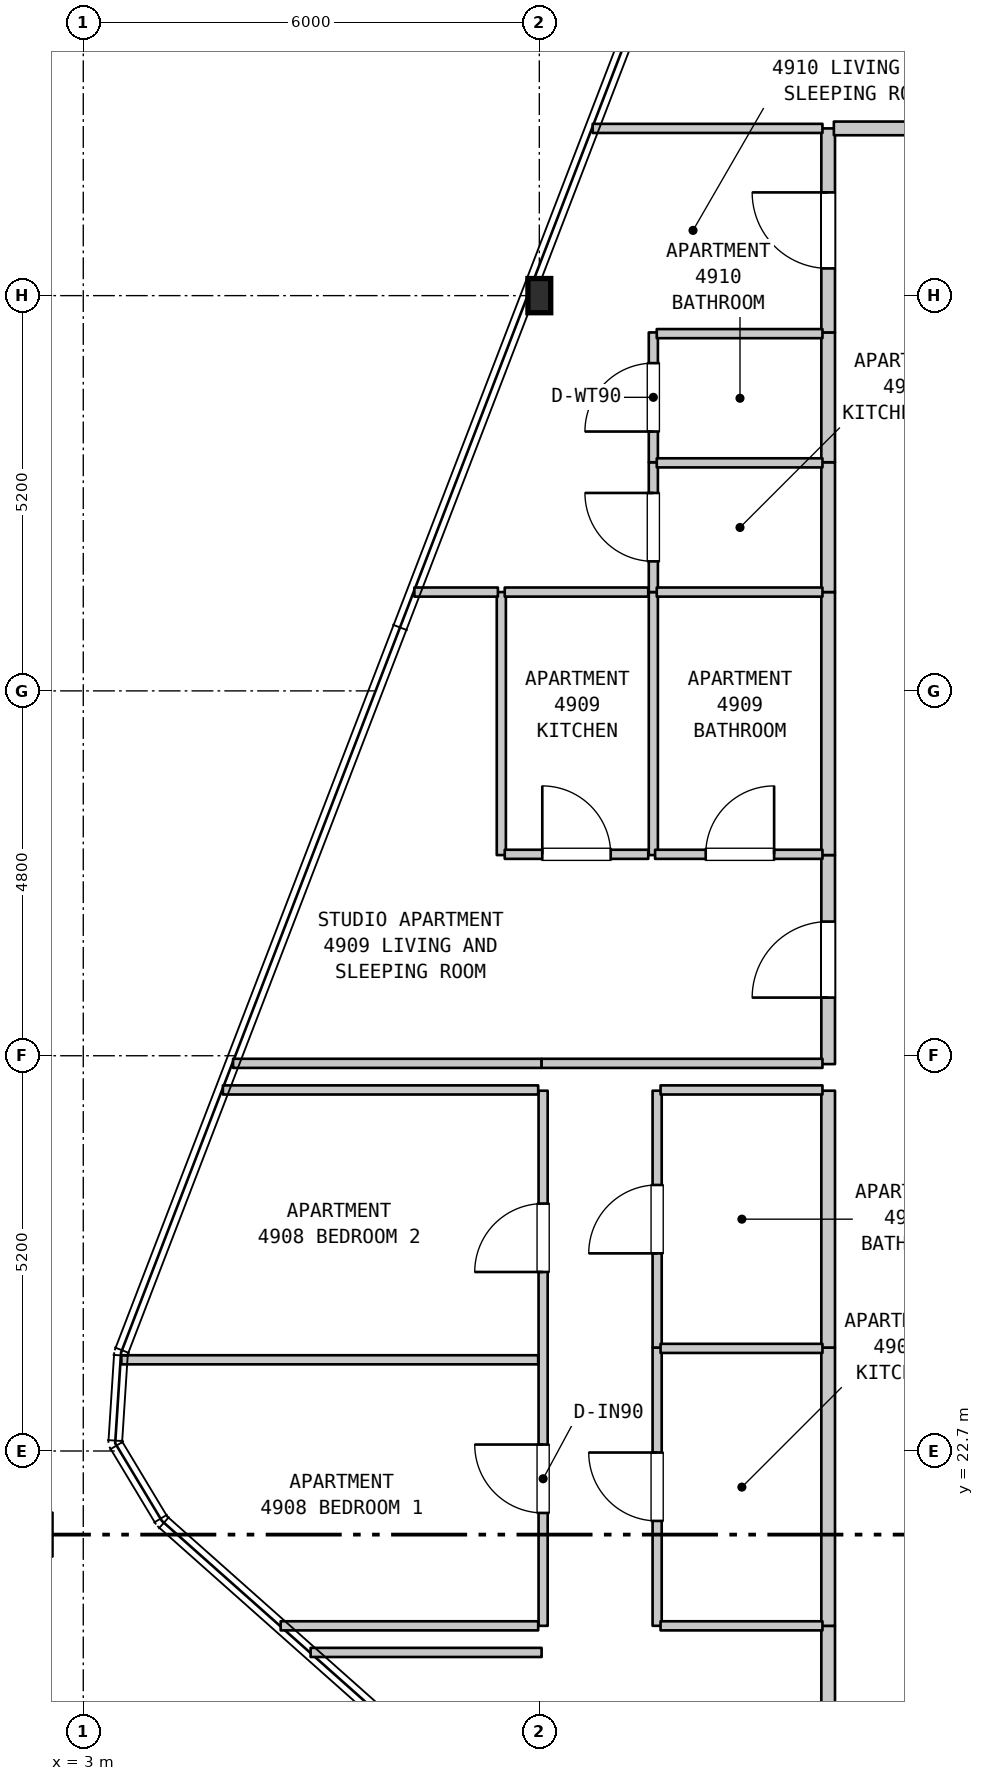
"""IFC4 building model, lengths in metres.
Left out: names, types, materials, properties, quantities, classifications, styles, units other than length and angle.
Written with IfcOpenShell. Run it as: python <this file> out.ifc"""

import sys

from ifc_helpers import new_model, si_unit, direction, frame, frame_2d, origin, origin_2d, place, context, subcontext, project, spatial, rectangle, i_section, extrude, element, fill, save


model = new_model("IFC4")
c1 = context("Model", 3, precision=1e-05, world=origin(), true_north=direction((0.0, 1.0)))
c2 = subcontext(c1, "Body", "Model", "MODEL_VIEW")
j1 = project(units=[si_unit("LENGTHUNIT", "METRE"), si_unit("PLANEANGLEUNIT", "RADIAN")], contexts=[c1])
p1 = place(None, origin())
s1 = spatial("IfcSite", under=j1, at=p1, CompositionType="ELEMENT")
p2 = place(p1, origin())
s2 = spatial("IfcBuilding", under=s1, at=p2, CompositionType="ELEMENT")
p3 = place(p2, frame((0.0, 0.0, 199.5)))
s3 = spatial("IfcBuildingStorey", under=s2, at=p3, CompositionType="ELEMENT", Elevation=199.5)
p4 = place(p3, frame((9.0, 37.9, 0.0), z_axis=(0.0, 0.0, 1.0), x_axis=(1.0, 0.0, 0.0)))
e1 = element("IfcColumn", 1, at=p4, inside=s3, PredefinedType="COLUMN", context=c2, shape_type="SweptSolid", body=[
    extrude(i_section(OverallWidth=0.3, OverallDepth=0.45, WebThickness=0.014, FlangeThickness=0.026, FilletRadius=0.027, at=origin_2d()), origin(), (0.0, 0.0, 1.0), 3.7),
])
p5 = place(p3, frame((8.5, 30.54, 0.0), z_axis=(0.0, 0.0, 1.0), x_axis=(0.0, 1.0, 0.0)))
e2 = element("IfcWall", 2, at=p5, inside=s3, PredefinedType="PARTITIONING", context=c2, shape_type="SweptSolid", body=[
    extrude(rectangle(XDim=3.46, YDim=0.12, at=frame_2d((1.73, 0.0))), origin(), (0.0, 0.0, 1.0), 3.39),
])
p6 = place(p3, frame((9.05, 20.4, 0.0), z_axis=(0.0, 0.0, 1.0), x_axis=(0.0, 1.0, 0.0)))
e3 = element("IfcWall", 3, at=p6, inside=s3, PredefinedType="PARTITIONING", context=c2, shape_type="SweptSolid", body=[
    extrude(rectangle(XDim=7.04, YDim=0.12, at=frame_2d((3.52, 0.0))), origin(), (0.0, 0.0, 1.0), 2.79),
])
p7 = place(p6, frame((1.485, 0.0, 0.0)))
e4 = element("IfcOpeningElement", 4, at=p7, cuts=e3, PredefinedType="OPENING", context=c2, shape_type="SweptSolid", body=[
    extrude(rectangle(XDim=0.9, YDim=2.15, at=frame_2d((0.45, 1.075))), frame((0.0, 0.07, 0.0), z_axis=(0.0, -1.0, 0.0), x_axis=(1.0, 0.0, 0.0)), (0.0, 0.0, 1.0), 0.14),
])
p8 = place(p6, frame((4.655, 0.0, 0.0)))
e5 = element("IfcOpeningElement", 5, at=p8, cuts=e3, PredefinedType="OPENING", context=c2, shape_type="SweptSolid", body=[
    extrude(rectangle(XDim=0.9, YDim=2.15, at=frame_2d((0.45, 1.075))), frame((0.0, 0.07, 0.0), z_axis=(0.0, -1.0, 0.0), x_axis=(1.0, 0.0, 0.0)), (0.0, 0.0, 1.0), 0.14),
])
p9 = place(p3, frame((10.5, 30.54, 0.0), z_axis=(0.0, 0.0, 1.0), x_axis=(0.0, 1.0, 0.0)))
e6 = element("IfcWall", 6, at=p9, inside=s3, PredefinedType="PARTITIONING", context=c2, shape_type="SweptSolid", body=[
    extrude(rectangle(XDim=3.46, YDim=0.12, at=frame_2d((1.73, 0.0))), origin(), (0.0, 0.0, 1.0), 3.39),
])
p10 = place(p3, frame((10.5, 34.0, 0.0), z_axis=(0.0, 0.0, 1.0), x_axis=(0.0, 1.0, 0.0)))
e7 = element("IfcWall", 7, at=p10, inside=s3, PredefinedType="PARTITIONING", context=c2, shape_type="SweptSolid", body=[
    extrude(rectangle(XDim=1.708, YDim=0.12, at=frame_2d((0.854, 0.0))), origin(), (0.0, 0.0, 1.0), 3.39),
])
p11 = place(p10, frame((0.404, 0.0, 0.0)))
e8 = element("IfcOpeningElement", 8, at=p11, cuts=e7, PredefinedType="OPENING", context=c2, shape_type="SweptSolid", body=[
    extrude(rectangle(XDim=0.9, YDim=2.15, at=frame_2d((0.45, 1.075))), frame((0.0, 0.07, 0.0), z_axis=(0.0, -1.0, 0.0), x_axis=(1.0, 0.0, 0.0)), (0.0, 0.0, 1.0), 0.14),
])
p12 = place(p3, frame((10.5, 35.708, 0.0), z_axis=(0.0, 0.0, 1.0), x_axis=(0.0, 1.0, 0.0)))
e9 = element("IfcWall", 9, at=p12, inside=s3, PredefinedType="PARTITIONING", context=c2, shape_type="SweptSolid", body=[
    extrude(rectangle(XDim=1.708, YDim=0.12, at=frame_2d((0.854, 0.0))), origin(), (0.0, 0.0, 1.0), 3.39),
])
p13 = place(p12, frame((0.404, 0.0, 0.0)))
e10 = element("IfcOpeningElement", 10, at=p13, cuts=e9, PredefinedType="OPENING", context=c2, shape_type="SweptSolid", body=[
    extrude(rectangle(XDim=0.9, YDim=2.1, at=frame_2d((0.45, 1.05))), frame((0.0, 0.07, 0.0), z_axis=(0.0, -1.0, 0.0), x_axis=(1.0, 0.0, 0.0)), (0.0, 0.0, 1.0), 0.14),
])
p14 = place(p3, frame((10.55, 20.4, 0.0), z_axis=(0.0, 0.0, 1.0), x_axis=(0.0, 1.0, 0.0)))
e11 = element("IfcWall", 11, at=p14, inside=s3, PredefinedType="PARTITIONING", context=c2, shape_type="SweptSolid", body=[
    extrude(rectangle(XDim=3.661, YDim=0.12, at=frame_2d((1.831, 0.0))), origin(), (0.0, 0.0, 1.0), 3.39),
])
p15 = place(p14, frame((1.38, 0.0, 0.0)))
e12 = element("IfcOpeningElement", 12, at=p15, cuts=e11, PredefinedType="OPENING", context=c2, shape_type="SweptSolid", body=[
    extrude(rectangle(XDim=0.9, YDim=2.15, at=frame_2d((0.45, 1.075))), frame((0.0, 0.07, 0.0), z_axis=(0.0, -1.0, 0.0), x_axis=(1.0, 0.0, 0.0)), (0.0, 0.0, 1.0), 0.14),
])
p16 = place(p3, frame((10.55, 24.061, 0.0), z_axis=(0.0, 0.0, 1.0), x_axis=(0.0, 1.0, 0.0)))
e13 = element("IfcWall", 13, at=p16, inside=s3, PredefinedType="PARTITIONING", context=c2, shape_type="SweptSolid", body=[
    extrude(rectangle(XDim=3.379, YDim=0.12, at=frame_2d((1.689, 0.0))), origin(), (0.0, 0.0, 1.0), 3.39),
])
p17 = place(p16, frame((1.239, 0.0, 0.0)))
e14 = element("IfcOpeningElement", 14, at=p17, cuts=e13, PredefinedType="OPENING", context=c2, shape_type="SweptSolid", body=[
    extrude(rectangle(XDim=0.9, YDim=2.1, at=frame_2d((0.45, 1.05))), frame((0.0, 0.07, 0.0), z_axis=(0.0, -1.0, 0.0), x_axis=(1.0, 0.0, 0.0)), (0.0, 0.0, 1.0), 0.14),
])
p18 = place(p3, frame((12.8, 17.3, 0.0), z_axis=(0.0, 0.0, 1.0), x_axis=(0.0, 1.0, 0.0)))
e15 = element("IfcWall", 15, at=p18, inside=s3, PredefinedType="STANDARD", context=c2, shape_type="SweptSolid", body=[
    extrude(rectangle(XDim=3.1, YDim=0.18, at=frame_2d((1.55, 0.0))), origin(), (0.0, 0.0, 1.0), 3.39),
])
p19 = place(p18, frame((0.978, 0.0, 0.0)))
e16 = element("IfcOpeningElement", 16, at=p19, cuts=e15, PredefinedType="OPENING", context=c2, shape_type="SweptSolid", body=[
    extrude(rectangle(XDim=1.0, YDim=2.15, at=frame_2d((0.5, 1.075))), frame((0.0, 0.1, 0.0), z_axis=(0.0, -1.0, 0.0), x_axis=(1.0, 0.0, 0.0)), (0.0, 0.0, 1.0), 0.2),
])
p20 = place(p3, frame((12.8, 20.4, 0.0), z_axis=(0.0, 0.0, 1.0), x_axis=(0.0, 1.0, 0.0)))
e17 = element("IfcWall", 17, at=p20, inside=s3, PredefinedType="STANDARD", context=c2, shape_type="SweptSolid", body=[
    extrude(rectangle(XDim=3.661, YDim=0.18, at=frame_2d((1.831, 0.0))), origin(), (0.0, 0.0, 1.0), 3.39),
])
p21 = place(p3, frame((12.8, 24.061, 0.0), z_axis=(0.0, 0.0, 1.0), x_axis=(0.0, 1.0, 0.0)))
e18 = element("IfcWall", 18, at=p21, inside=s3, PredefinedType="STANDARD", context=c2, shape_type="SweptSolid", body=[
    extrude(rectangle(XDim=3.379, YDim=0.18, at=frame_2d((1.689, 0.0))), origin(), (0.0, 0.0, 1.0), 3.39),
])
p22 = place(p3, frame((12.8, 27.79, 0.0), z_axis=(0.0, 0.0, 1.0), x_axis=(0.0, 1.0, 0.0)))
e19 = element("IfcWall", 19, at=p22, inside=s3, PredefinedType="STANDARD", context=c2, shape_type="SweptSolid", body=[
    extrude(rectangle(XDim=2.75, YDim=0.18, at=frame_2d((1.375, 0.0))), origin(), (0.0, 0.0, 1.0), 3.39),
])
p23 = place(p22, frame((0.875, 0.0, 0.0)))
e20 = element("IfcOpeningElement", 20, at=p23, cuts=e19, PredefinedType="OPENING", context=c2, shape_type="SweptSolid", body=[
    extrude(rectangle(XDim=1.0, YDim=2.15, at=frame_2d((0.5, 1.075))), frame((0.0, 0.1, 0.0), z_axis=(0.0, -1.0, 0.0), x_axis=(1.0, 0.0, 0.0)), (0.0, 0.0, 1.0), 0.2),
])
p24 = place(p3, frame((12.8, 30.54, 0.0), z_axis=(0.0, 0.0, 1.0), x_axis=(0.0, 1.0, 0.0)))
e21 = element("IfcWall", 21, at=p24, inside=s3, PredefinedType="STANDARD", context=c2, shape_type="SweptSolid", body=[
    extrude(rectangle(XDim=3.46, YDim=0.18, at=frame_2d((1.73, 0.0))), origin(), (0.0, 0.0, 1.0), 3.39),
])
for number, where, z_axis, x_axis in (
    (22, (12.8, 34.0, 0.0), (0.0, 0.0, 1.0), (0.0, 1.0, 0.0)),
    (23, (12.8, 35.708, 0.0), (0.0, 0.0, 1.0), (0.0, 1.0, 0.0)),
):
    element("IfcWall", number, at=place(p3, frame(where, z_axis=z_axis, x_axis=x_axis)), inside=s3, PredefinedType="STANDARD", context=c2, shape_type="SweptSolid", body=[
        extrude(rectangle(XDim=1.708, YDim=0.18, at=frame_2d((0.854, 0.0))), origin(), (0.0, 0.0, 1.0), 3.39),
    ])
p25 = place(p3, frame((12.8, 37.416, 0.0), z_axis=(0.0, 0.0, 1.0), x_axis=(0.0, 1.0, 0.0)))
e24 = element("IfcWall", 24, at=p25, inside=s3, PredefinedType="STANDARD", context=c2, shape_type="SweptSolid", body=[
    extrude(rectangle(XDim=2.684, YDim=0.18, at=frame_2d((1.342, 0.0))), origin(), (0.0, 0.0, 1.0), 3.39),
])
p26 = place(p25, frame((0.842, 0.0, 0.0)))
e25 = element("IfcOpeningElement", 25, at=p26, cuts=e24, PredefinedType="OPENING", context=c2, shape_type="SweptSolid", body=[
    extrude(rectangle(XDim=1.0, YDim=2.15, at=frame_2d((0.5, 1.075))), frame((0.0, 0.1, 0.0), z_axis=(0.0, -1.0, 0.0), x_axis=(1.0, 0.0, 0.0)), (0.0, 0.0, 1.0), 0.2),
])
p27 = place(p3, frame((5.991, 20.05, 0.0), z_axis=(0.0, 0.0, 1.0), x_axis=(1.0, 0.0, 0.0)))
e26 = element("IfcWall", 26, at=p27, inside=s3, PredefinedType="PARTITIONING", context=c2, shape_type="SweptSolid", body=[
    extrude(rectangle(XDim=3.039, YDim=0.12, at=frame_2d((1.52, 0.0))), origin(), (0.0, 0.0, 1.0), 3.39),
])
p28 = place(p3, frame((5.597, 20.4, 0.0), z_axis=(0.0, 0.0, 1.0), x_axis=(1.0, 0.0, 0.0)))
e27 = element("IfcWall", 27, at=p28, inside=s3, PredefinedType="PARTITIONING", context=c2, shape_type="SweptSolid", body=[
    extrude(rectangle(XDim=3.388, YDim=0.12, at=frame_2d((1.694, 0.0))), origin(), (0.0, 0.0, 1.0), 3.39),
])
p29 = place(p3, frame((10.595, 20.4, 0.0), z_axis=(0.0, 0.0, 1.0), x_axis=(1.0, 0.0, 0.0)))
e28 = element("IfcWall", 28, at=p29, inside=s3, PredefinedType="PARTITIONING", context=c2, shape_type="SweptSolid", body=[
    extrude(rectangle(XDim=2.13, YDim=0.12, at=frame_2d((1.065, 0.0))), origin(), (0.0, 0.0, 1.0), 3.39),
])
p30 = place(p3, frame((3.501, 23.9, 0.0), z_axis=(0.0, 0.0, 1.0), x_axis=(1.0, 0.0, 0.0)))
e29 = element("IfcWall", 29, at=p30, inside=s3, PredefinedType="PARTITIONING", context=c2, shape_type="SweptSolid", body=[
    extrude(rectangle(XDim=5.484, YDim=0.12, at=frame_2d((2.742, 0.0))), origin(), (0.0, 0.0, 1.0), 3.39),
])
p31 = place(p3, frame((10.595, 24.05, 0.0), z_axis=(0.0, 0.0, 1.0), x_axis=(1.0, 0.0, 0.0)))
e30 = element("IfcWall", 30, at=p31, inside=s3, PredefinedType="PARTITIONING", context=c2, shape_type="SweptSolid", body=[
    extrude(rectangle(XDim=2.13, YDim=0.12, at=frame_2d((1.065, 0.0))), origin(), (0.0, 0.0, 1.0), 3.39),
])
p32 = place(p3, frame((4.837, 27.45, 0.0), z_axis=(0.0, 0.0, 1.0), x_axis=(1.0, 0.0, 0.0)))
e31 = element("IfcWall", 31, at=p32, inside=s3, PredefinedType="PARTITIONING", context=c2, shape_type="SweptSolid", body=[
    extrude(rectangle(XDim=4.148, YDim=0.12, at=frame_2d((2.074, 0.0))), origin(), (0.0, 0.0, 1.0), 3.39),
])
p33 = place(p3, frame((10.595, 27.45, 0.0), z_axis=(0.0, 0.0, 1.0), x_axis=(1.0, 0.0, 0.0)))
e32 = element("IfcWall", 32, at=p33, inside=s3, PredefinedType="PARTITIONING", context=c2, shape_type="SweptSolid", body=[
    extrude(rectangle(XDim=2.13, YDim=0.12, at=frame_2d((1.065, 0.0))), origin(), (0.0, 0.0, 1.0), 3.39),
])
p34 = place(p3, frame((4.971, 27.8, 0.0), z_axis=(0.0, 0.0, 1.0), x_axis=(1.0, 0.0, 0.0)))
e33 = element("IfcWall", 33, at=p34, inside=s3, PredefinedType="PARTITIONING", context=c2, shape_type="SweptSolid", body=[
    extrude(rectangle(XDim=4.059, YDim=0.12, at=frame_2d((2.03, 0.0))), origin(), (0.0, 0.0, 1.0), 3.39),
])
p35 = place(p3, frame((9.03, 27.8, 0.0), z_axis=(0.0, 0.0, 1.0), x_axis=(1.0, 0.0, 0.0)))
e34 = element("IfcWall", 34, at=p35, inside=s3, PredefinedType="PARTITIONING", context=c2, shape_type="SweptSolid", body=[
    extrude(rectangle(XDim=3.695, YDim=0.12, at=frame_2d((1.848, 0.0))), origin(), (0.0, 0.0, 1.0), 3.39),
])
p36 = place(p3, frame((8.545, 30.55, 0.0), z_axis=(0.0, 0.0, 1.0), x_axis=(1.0, 0.0, 0.0)))
e35 = element("IfcWall", 35, at=p36, inside=s3, PredefinedType="PARTITIONING", context=c2, shape_type="SweptSolid", body=[
    extrude(rectangle(XDim=1.888, YDim=0.12, at=frame_2d((0.944, 0.0))), origin(), (0.0, 0.0, 1.0), 3.39),
])
p37 = place(p36, frame((0.494, 0.0, 0.0)))
e36 = element("IfcOpeningElement", 36, at=p37, cuts=e35, PredefinedType="OPENING", context=c2, shape_type="SweptSolid", body=[
    extrude(rectangle(XDim=0.9, YDim=2.15, at=frame_2d((0.45, 1.075))), frame((0.0, 0.07, 0.0), z_axis=(0.0, -1.0, 0.0), x_axis=(1.0, 0.0, 0.0)), (0.0, 0.0, 1.0), 0.14),
])
p38 = place(p3, frame((10.523, 30.55, 0.0), z_axis=(0.0, 0.0, 1.0), x_axis=(1.0, 0.0, 0.0)))
e37 = element("IfcWall", 37, at=p38, inside=s3, PredefinedType="PARTITIONING", context=c2, shape_type="SweptSolid", body=[
    extrude(rectangle(XDim=2.202, YDim=0.12, at=frame_2d((1.101, 0.0))), origin(), (0.0, 0.0, 1.0), 3.39),
])
p39 = place(p38, frame((0.666, 0.0, 0.0)))
e38 = element("IfcOpeningElement", 38, at=p39, cuts=e37, PredefinedType="OPENING", context=c2, shape_type="SweptSolid", body=[
    extrude(rectangle(XDim=0.9, YDim=2.1, at=frame_2d((0.45, 1.05))), frame((0.0, 0.07, 0.0), z_axis=(0.0, -1.0, 0.0), x_axis=(1.0, 0.0, 0.0)), (0.0, 0.0, 1.0), 0.14),
])
p40 = place(p3, frame((7.356, 34.0, 0.0), z_axis=(0.0, 0.0, 1.0), x_axis=(1.0, 0.0, 0.0)))
e39 = element("IfcWall", 39, at=p40, inside=s3, PredefinedType="PARTITIONING", context=c2, shape_type="SweptSolid", body=[
    extrude(rectangle(XDim=1.099, YDim=0.12, at=frame_2d((0.55, 0.0))), origin(), (0.0, 0.0, 1.0), 3.39),
])
p41 = place(p3, frame((8.545, 34.0, 0.0), z_axis=(0.0, 0.0, 1.0), x_axis=(1.0, 0.0, 0.0)))
e40 = element("IfcWall", 40, at=p41, inside=s3, PredefinedType="PARTITIONING", context=c2, shape_type="SweptSolid", body=[
    extrude(rectangle(XDim=1.888, YDim=0.12, at=frame_2d((0.944, 0.0))), origin(), (0.0, 0.0, 1.0), 3.39),
])
for number, where, z_axis, x_axis in (
    (41, (10.545, 34.0, 0.0), (0.0, 0.0, 1.0), (1.0, 0.0, 0.0)),
    (42, (10.545, 35.7, 0.0), (0.0, 0.0, 1.0), (1.0, 0.0, 0.0)),
    (43, (10.545, 37.4, 0.0), (0.0, 0.0, 1.0), (1.0, 0.0, 0.0)),
):
    element("IfcWall", number, at=place(p3, frame(where, z_axis=z_axis, x_axis=x_axis)), inside=s3, PredefinedType="PARTITIONING", context=c2, shape_type="SweptSolid", body=[
        extrude(rectangle(XDim=2.18, YDim=0.12, at=frame_2d((1.09, 0.0))), origin(), (0.0, 0.0, 1.0), 3.39),
    ])
p42 = place(p3, frame((9.702, 40.1, 0.0), z_axis=(0.0, 0.0, 1.0), x_axis=(1.0, 0.0, 0.0)))
e44 = element("IfcWall", 44, at=p42, inside=s3, PredefinedType="PARTITIONING", context=c2, shape_type="SweptSolid", body=[
    extrude(rectangle(XDim=3.023, YDim=0.12, at=frame_2d((1.512, 0.0))), origin(), (0.0, 0.0, 1.0), 3.39),
])
p43 = place(p3, frame((12.875, 40.1, 0.0), z_axis=(0.0, 0.0, 1.0), x_axis=(1.0, 0.0, 0.0)))
e45 = element("IfcWall", 45, at=p43, inside=s3, PredefinedType="STANDARD", context=c2, shape_type="SweptSolid", body=[
    extrude(rectangle(XDim=2.125, YDim=0.18, at=frame_2d((1.062, 0.0))), origin(), (0.0, 0.0, 1.0), 3.39),
])
p44 = place(p7, origin())
e46 = element("IfcDoor", 46, at=p44, inside=s3, OperationType="SINGLE_SWING_RIGHT", PredefinedType="DOOR", context=c2, shape_type="SweptSolid", body=[
    extrude(rectangle(XDim=0.9, YDim=2.15, at=frame_2d((0.45, 1.075))), frame((0.0, 0.025, 0.0), z_axis=(0.0, -1.0, 0.0), x_axis=(1.0, 0.0, 0.0)), (0.0, 0.0, 1.0), 0.05),
])
fill(e4, e46)
p45 = place(p8, origin())
e47 = element("IfcDoor", 47, at=p45, inside=s3, OperationType="SINGLE_SWING_LEFT", PredefinedType="DOOR", context=c2, shape_type="SweptSolid", body=[
    extrude(rectangle(XDim=0.9, YDim=2.15, at=frame_2d((0.45, 1.075))), frame((0.0, 0.025, 0.0), z_axis=(0.0, -1.0, 0.0), x_axis=(1.0, 0.0, 0.0)), (0.0, 0.0, 1.0), 0.05),
])
fill(e5, e47)
p46 = place(p11, origin())
e48 = element("IfcDoor", 48, at=p46, inside=s3, OperationType="SINGLE_SWING_RIGHT", PredefinedType="DOOR", context=c2, shape_type="SweptSolid", body=[
    extrude(rectangle(XDim=0.9, YDim=2.15, at=frame_2d((0.45, 1.075))), frame((0.0, 0.025, 0.0), z_axis=(0.0, -1.0, 0.0), x_axis=(1.0, 0.0, 0.0)), (0.0, 0.0, 1.0), 0.05),
])
fill(e8, e48)
p47 = place(p13, origin())
e49 = element("IfcDoor", 49, at=p47, inside=s3, OperationType="SINGLE_SWING_LEFT", PredefinedType="DOOR", context=c2, shape_type="SweptSolid", body=[
    extrude(rectangle(XDim=0.9, YDim=2.1, at=frame_2d((0.45, 1.05))), frame((0.0, 0.025, 0.0), z_axis=(0.0, -1.0, 0.0), x_axis=(1.0, 0.0, 0.0)), (0.0, 0.0, 1.0), 0.05),
])
fill(e10, e49)
p48 = place(p15, origin())
e50 = element("IfcDoor", 50, at=p48, inside=s3, OperationType="SINGLE_SWING_RIGHT", PredefinedType="DOOR", context=c2, shape_type="SweptSolid", body=[
    extrude(rectangle(XDim=0.9, YDim=2.15, at=frame_2d((0.45, 1.075))), frame((0.0, 0.025, 0.0), z_axis=(0.0, -1.0, 0.0), x_axis=(1.0, 0.0, 0.0)), (0.0, 0.0, 1.0), 0.05),
])
fill(e12, e50)
p49 = place(p17, origin())
e51 = element("IfcDoor", 51, at=p49, inside=s3, OperationType="SINGLE_SWING_LEFT", PredefinedType="DOOR", context=c2, shape_type="SweptSolid", body=[
    extrude(rectangle(XDim=0.9, YDim=2.1, at=frame_2d((0.45, 1.05))), frame((0.0, 0.025, 0.0), z_axis=(0.0, -1.0, 0.0), x_axis=(1.0, 0.0, 0.0)), (0.0, 0.0, 1.0), 0.05),
])
fill(e14, e51)
p50 = place(p23, origin())
e52 = element("IfcDoor", 52, at=p50, inside=s3, OperationType="SINGLE_SWING_LEFT", PredefinedType="DOOR", context=c2, shape_type="SweptSolid", body=[
    extrude(rectangle(XDim=1.0, YDim=2.15, at=frame_2d((0.5, 1.075))), frame((0.0, 0.025, 0.0), z_axis=(0.0, -1.0, 0.0), x_axis=(1.0, 0.0, 0.0)), (0.0, 0.0, 1.0), 0.05),
])
fill(e20, e52)
p51 = place(p26, origin())
e53 = element("IfcDoor", 53, at=p51, inside=s3, OperationType="SINGLE_SWING_RIGHT", PredefinedType="DOOR", context=c2, shape_type="SweptSolid", body=[
    extrude(rectangle(XDim=1.0, YDim=2.15, at=frame_2d((0.5, 1.075))), frame((0.0, 0.025, 0.0), z_axis=(0.0, -1.0, 0.0), x_axis=(1.0, 0.0, 0.0)), (0.0, 0.0, 1.0), 0.05),
])
fill(e25, e53)
p52 = place(p37, origin())
e54 = element("IfcDoor", 54, at=p52, inside=s3, OperationType="SINGLE_SWING_LEFT", PredefinedType="DOOR", context=c2, shape_type="SweptSolid", body=[
    extrude(rectangle(XDim=0.9, YDim=2.15, at=frame_2d((0.45, 1.075))), frame((0.0, 0.025, 0.0), z_axis=(0.0, -1.0, 0.0), x_axis=(1.0, 0.0, 0.0)), (0.0, 0.0, 1.0), 0.05),
])
fill(e36, e54)
p53 = place(p39, origin())
e55 = element("IfcDoor", 55, at=p53, inside=s3, OperationType="SINGLE_SWING_RIGHT", PredefinedType="DOOR", context=c2, shape_type="SweptSolid", body=[
    extrude(rectangle(XDim=0.9, YDim=2.1, at=frame_2d((0.45, 1.05))), frame((0.0, 0.025, 0.0), z_axis=(0.0, -1.0, 0.0), x_axis=(1.0, 0.0, 0.0)), (0.0, 0.0, 1.0), 0.05),
])
fill(e38, e55)
save(model, sys.argv[1])
